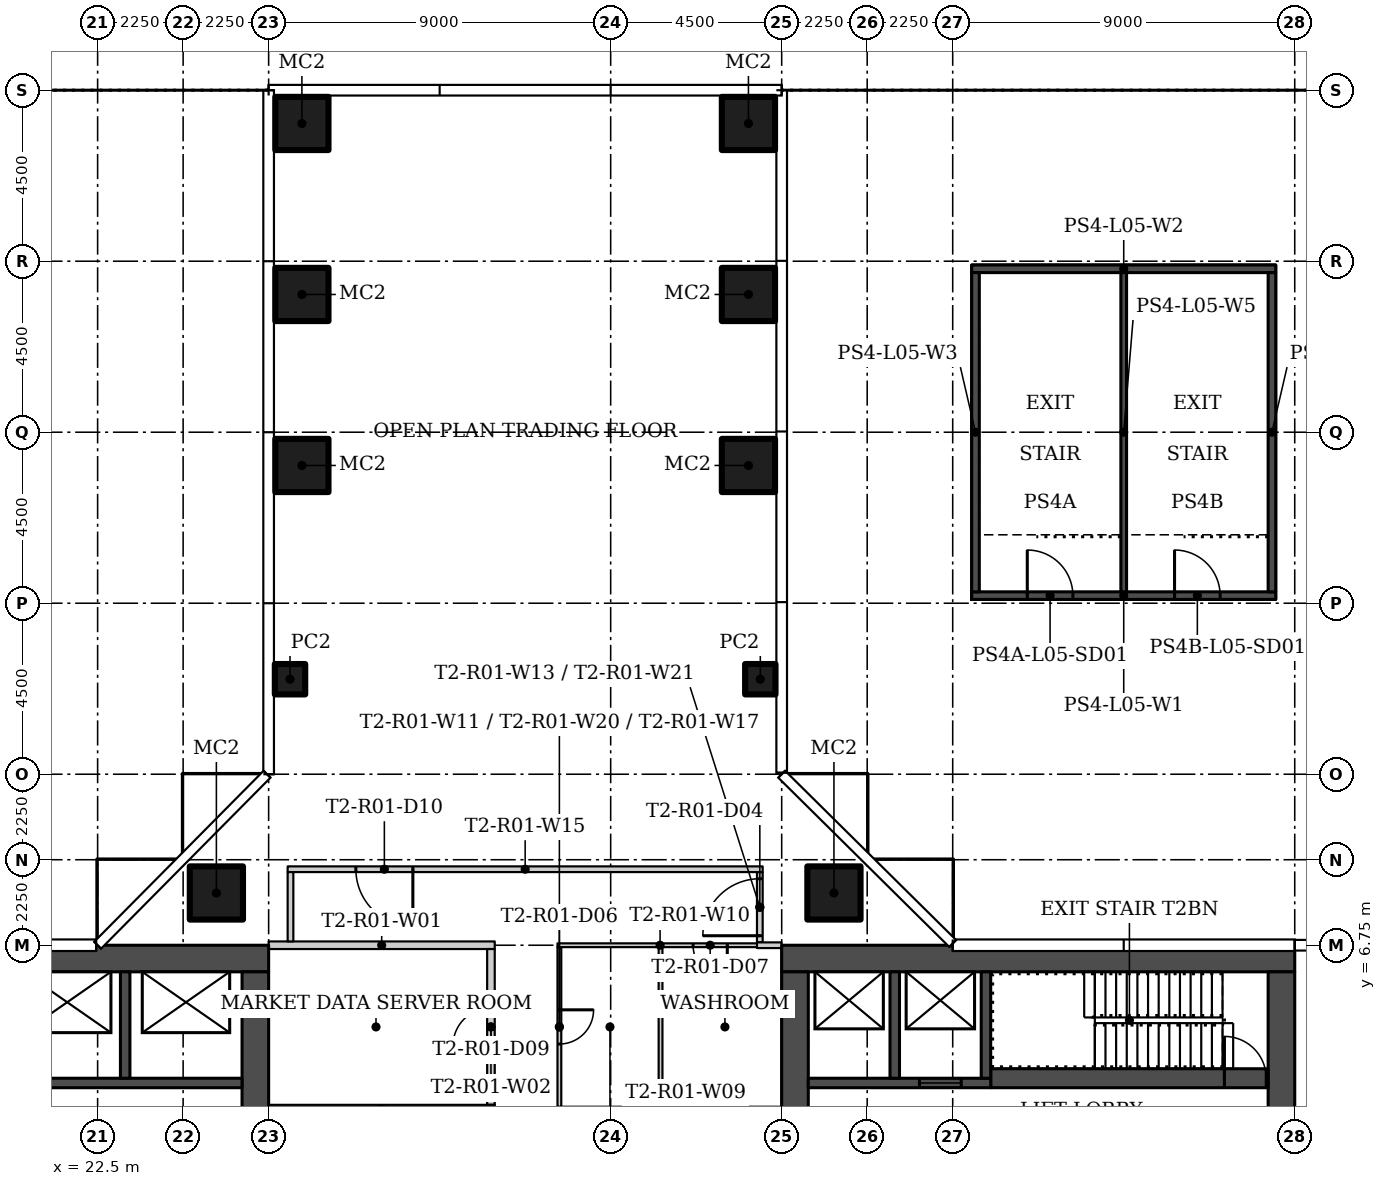
"""IFC4 building model, lengths in metres.
Left out: names, types, materials, properties, quantities, classifications, styles, units other than length and angle.
Written with IfcOpenShell. Run it as: python <this file> out.ifc"""

import sys

from ifc_helpers import new_model, si_unit, direction, frame, frame_2d, origin, origin_2d, place, context, subcontext, project, spatial, rectangle, hollow_rectangle, extrude, element, fill, save


model = new_model("IFC4")
c1 = context("Model", 3, precision=1e-05, world=origin(), true_north=direction((0.0, 1.0)))
c2 = subcontext(c1, "Body", "Model", "MODEL_VIEW")
j1 = project(units=[si_unit("LENGTHUNIT", "METRE"), si_unit("PLANEANGLEUNIT", "RADIAN")], contexts=[c1])
p1 = place(None, origin())
s1 = spatial("IfcSite", under=j1, at=p1, CompositionType="ELEMENT")
p2 = place(p1, origin())
s2 = spatial("IfcBuilding", under=s1, at=p2, CompositionType="ELEMENT")
p3 = place(p2, frame((0.0, 0.0, 28.5)))
s3 = spatial("IfcBuildingStorey", under=s2, at=p3, CompositionType="ELEMENT", Elevation=28.5)
for number, where in (
    (1, (25.625, 8.125, 0.0)),
    (2, (41.875, 8.125, 0.0)),
):
    element("IfcColumn", number, at=place(p3, frame(where)), inside=s3, PredefinedType="COLUMN", context=c2, shape_type="SweptSolid", body=[
        extrude(hollow_rectangle(XDim=1.4, YDim=1.4, WallThickness=0.05, at=origin_2d()), origin(), (0.0, 0.0, 1.0), 4.15),
    ])
p4 = place(p3, frame((39.938, 13.75, 0.0)))
e3 = element("IfcColumn", 3, at=p4, inside=s3, PredefinedType="COLUMN", context=c2, shape_type="SweptSolid", body=[
    extrude(hollow_rectangle(XDim=0.8, YDim=0.8, WallThickness=0.025, at=origin_2d()), origin(), (0.0, 0.0, 1.0), 4.15),
])
for number, where in (
    (4, (39.625, 19.375, 0.0)),
    (5, (39.625, 23.875, 0.0)),
    (6, (39.625, 28.375, 0.0)),
):
    element("IfcColumn", number, at=place(p3, frame(where)), inside=s3, PredefinedType="COLUMN", context=c2, shape_type="SweptSolid", body=[
        extrude(hollow_rectangle(XDim=1.4, YDim=1.4, WallThickness=0.05, at=origin_2d()), origin(), (0.0, 0.0, 1.0), 4.15),
    ])
p5 = place(p3, frame((27.562, 13.75, 0.0)))
e7 = element("IfcColumn", 7, at=p5, inside=s3, PredefinedType="COLUMN", context=c2, shape_type="SweptSolid", body=[
    extrude(hollow_rectangle(XDim=0.8, YDim=0.8, WallThickness=0.025, at=origin_2d()), origin(), (0.0, 0.0, 1.0), 4.15),
])
for number, where in (
    (8, (27.875, 19.375, 0.0)),
    (9, (27.875, 23.875, 0.0)),
    (10, (27.875, 28.375, 0.0)),
):
    element("IfcColumn", number, at=place(p3, frame(where)), inside=s3, PredefinedType="COLUMN", context=c2, shape_type="SweptSolid", body=[
        extrude(hollow_rectangle(XDim=1.4, YDim=1.4, WallThickness=0.05, at=origin_2d()), origin(), (0.0, 0.0, 1.0), 4.15),
    ])
p6 = place(p3, frame((32.95, 6.75, 0.0), z_axis=(0.0, 0.0, 1.0), x_axis=(-1.0, 0.0, 0.0)))
e11 = element("IfcWall", 11, at=p6, inside=s3, PredefinedType="PARTITIONING", context=c2, shape_type="SweptSolid", body=[
    extrude(rectangle(XDim=5.95, YDim=0.2, at=frame_2d((2.975, 0.0))), origin(), (0.0, 0.0, 1.0), 4.15),
])
p7 = place(p3, frame((32.85, 2.55, 0.0), z_axis=(0.0, 0.0, 1.0), x_axis=(0.0, 1.0, 0.0)))
e12 = element("IfcWall", 12, at=p7, inside=s3, PredefinedType="PARTITIONING", context=c2, shape_type="SweptSolid", body=[
    extrude(rectangle(XDim=4.1, YDim=0.2, at=frame_2d((2.05, 0.0))), origin(), (0.0, 0.0, 1.0), 4.15),
])
p8 = place(p7, frame((1.55, 0.0, 0.0)))
e13 = element("IfcOpeningElement", 13, at=p8, cuts=e12, PredefinedType="OPENING", context=c2, shape_type="SweptSolid", body=[
    extrude(rectangle(XDim=1.0, YDim=2.1, at=frame_2d((0.5, 1.05))), frame((0.0, 0.11, 0.0), z_axis=(0.0, -1.0, 0.0), x_axis=(1.0, 0.0, 0.0)), (0.0, 0.0, 1.0), 0.22),
])
p9 = place(p3, frame((27.0, 2.45, 0.0)))
e14 = element("IfcWall", 14, at=p9, inside=s3, PredefinedType="PARTITIONING", context=c2, shape_type="SweptSolid", body=[
    extrude(rectangle(XDim=5.95, YDim=0.2, at=frame_2d((2.975, 0.0))), origin(), (0.0, 0.0, 1.0), 4.15),
])
p10 = place(p3, frame((34.6, 2.45, 0.0)))
e15 = element("IfcWall", 15, at=p10, inside=s3, PredefinedType="PARTITIONING", context=c2, shape_type="SweptSolid", body=[
    extrude(rectangle(XDim=5.9, YDim=0.1, at=frame_2d((2.95, 0.0))), origin(), (0.0, 0.0, 1.0), 4.15),
])
p11 = place(p3, frame((40.0, 6.75, 0.0), z_axis=(0.0, 0.0, 1.0), x_axis=(-1.0, 0.0, 0.0)))
e16 = element("IfcWall", 16, at=p11, inside=s3, PredefinedType="PARTITIONING", context=c2, shape_type="SweptSolid", body=[
    extrude(rectangle(XDim=5.399, YDim=0.1, at=frame_2d((2.7, 0.0))), origin(), (0.0, 0.0, 1.0), 4.15),
])
p12 = place(p11, frame((0.931, 0.0, 0.0)))
e17 = element("IfcOpeningElement", 17, at=p12, cuts=e16, PredefinedType="OPENING", context=c2, shape_type="SweptSolid", body=[
    extrude(rectangle(XDim=0.9, YDim=2.1, at=frame_2d((0.45, 1.05))), frame((0.0, 0.06, 0.0), z_axis=(0.0, -1.0, 0.0), x_axis=(1.0, 0.0, 0.0)), (0.0, 0.0, 1.0), 0.12),
])
p13 = place(p3, frame((34.65, 6.7, 0.0), z_axis=(0.0, 0.0, 1.0), x_axis=(0.0, -1.0, 0.0)))
e18 = element("IfcWall", 18, at=p13, inside=s3, PredefinedType="PARTITIONING", context=c2, shape_type="SweptSolid", body=[
    extrude(rectangle(XDim=4.2, YDim=0.1, at=frame_2d((2.1, 0.0))), origin(), (0.0, 0.0, 1.0), 4.15),
])
p14 = place(p13, frame((1.65, 0.0, 0.0)))
e19 = element("IfcOpeningElement", 19, at=p14, cuts=e18, PredefinedType="OPENING", context=c2, shape_type="SweptSolid", body=[
    extrude(rectangle(XDim=0.9, YDim=2.1, at=frame_2d((0.45, 1.05))), frame((0.0, 0.06, 0.0), z_axis=(0.0, -1.0, 0.0), x_axis=(1.0, 0.0, 0.0)), (0.0, 0.0, 1.0), 0.12),
])
p15 = place(p3, frame((39.925, 6.825, 0.0), z_axis=(0.0, 0.0, 1.0), x_axis=(0.0, 1.0, 0.0)))
e20 = element("IfcWall", 20, at=p15, inside=s3, PredefinedType="PARTITIONING", context=c2, shape_type="SweptSolid", body=[
    extrude(rectangle(XDim=1.85, YDim=0.15, at=frame_2d((0.925, 0.0))), origin(), (0.0, 0.0, 1.0), 4.15),
])
p16 = place(p15, frame((0.175, 0.0, 0.0)))
e21 = element("IfcOpeningElement", 21, at=p16, cuts=e20, PredefinedType="OPENING", context=c2, shape_type="SweptSolid", body=[
    extrude(rectangle(XDim=1.5, YDim=2.4, at=frame_2d((0.75, 1.2))), frame((0.0, 0.085, 0.0), z_axis=(0.0, -1.0, 0.0), x_axis=(1.0, 0.0, 0.0)), (0.0, 0.0, 1.0), 0.17),
])
p17 = place(p3, frame((40.0, 8.75, 0.0), z_axis=(0.0, 0.0, 1.0), x_axis=(-1.0, 0.0, 0.0)))
e22 = element("IfcWall", 22, at=p17, inside=s3, PredefinedType="PARTITIONING", context=c2, shape_type="SweptSolid", body=[
    extrude(rectangle(XDim=12.5, YDim=0.15, at=frame_2d((6.25, 0.0))), origin(), (0.0, 0.0, 1.0), 4.15),
])
p18 = place(p17, frame((9.205, 0.0, 0.0)))
e23 = element("IfcOpeningElement", 23, at=p18, cuts=e22, PredefinedType="OPENING", context=c2, shape_type="SweptSolid", body=[
    extrude(rectangle(XDim=1.5, YDim=2.4, at=frame_2d((0.75, 1.2))), frame((0.0, 0.085, 0.0), z_axis=(0.0, -1.0, 0.0), x_axis=(1.0, 0.0, 0.0)), (0.0, 0.0, 1.0), 0.17),
])
p19 = place(p3, frame((27.575, 8.675, 0.0), z_axis=(0.0, 0.0, 1.0), x_axis=(0.0, -1.0, 0.0)))
e24 = element("IfcWall", 24, at=p19, inside=s3, PredefinedType="PARTITIONING", context=c2, shape_type="SweptSolid", body=[
    extrude(rectangle(XDim=1.825, YDim=0.15, at=frame_2d((0.913, 0.0))), origin(), (0.0, 0.0, 1.0), 4.15),
])
p20 = place(p3, frame((37.312, 6.7, 0.0), z_axis=(0.0, 0.0, 1.0), x_axis=(0.0, -1.0, 0.0)))
e25 = element("IfcWall", 25, at=p20, inside=s3, PredefinedType="PARTITIONING", context=c2, shape_type="SweptSolid", body=[
    extrude(rectangle(XDim=4.2, YDim=0.1, at=frame_2d((2.1, 0.0))), origin(), (0.0, 0.0, 1.0), 4.15),
])
p21 = place(p3, frame((40.5, 6.75, 0.0), z_axis=(0.0, 0.0, 1.0), x_axis=(-1.0, 0.0, 0.0)))
e26 = element("IfcWall", 26, at=p21, inside=s3, PredefinedType="PARTITIONING", context=c2, shape_type="SweptSolid", body=[
    extrude(rectangle(XDim=0.65, YDim=0.15, at=frame_2d((0.325, 0.0))), origin(), (0.0, 0.0, 1.0), 4.15),
])
p22 = place(p3, frame((13.5, 6.4, 0.0)))
e27 = element("IfcWall", 27, at=p22, inside=s3, PredefinedType="SHEAR", context=c2, shape_type="SweptSolid", body=[
    extrude(rectangle(XDim=13.5, YDim=0.7, at=frame_2d((6.75, 0.0))), origin(), (0.0, 0.0, 1.0), 4.15),
])
p23 = place(p3, frame((26.65, 6.05, 0.0), z_axis=(0.0, 0.0, 1.0), x_axis=(0.0, -1.0, 0.0)))
e28 = element("IfcWall", 28, at=p23, inside=s3, PredefinedType="SHEAR", context=c2, shape_type="SweptSolid", body=[
    extrude(rectangle(XDim=12.1, YDim=0.7, at=frame_2d((6.05, 0.0))), origin(), (0.0, 0.0, 1.0), 4.15),
])
p24 = place(p23, frame((10.1, 0.0, 0.0)))
e29 = element("IfcOpeningElement", 29, at=p24, cuts=e28, PredefinedType="OPENING", context=c2, shape_type="SweptSolid", body=[
    extrude(rectangle(XDim=1.2, YDim=2.1, at=frame_2d((0.6, 1.05))), frame((0.0, 0.36, 0.0), z_axis=(0.0, -1.0, 0.0), x_axis=(1.0, 0.0, 0.0)), (0.0, 0.0, 1.0), 0.72),
])
p25 = place(p23, frame((3.9, 0.0, 0.0)))
e30 = element("IfcOpeningElement", 30, at=p25, cuts=e28, PredefinedType="OPENING", context=c2, shape_type="SweptSolid", body=[
    extrude(rectangle(XDim=1.8, YDim=2.4, at=frame_2d((0.9, 1.2))), frame((0.0, 0.36, 0.0), z_axis=(0.0, -1.0, 0.0), x_axis=(1.0, 0.0, 0.0)), (0.0, 0.0, 1.0), 0.72),
])
p26 = place(p3, frame((14.2, 3.125, 0.0)))
e31 = element("IfcWall", 31, at=p26, inside=s3, PredefinedType="SHEAR", context=c2, shape_type="SweptSolid", body=[
    extrude(rectangle(XDim=12.1, YDim=0.25, at=frame_2d((6.05, 0.0))), origin(), (0.0, 0.0, 1.0), 4.15),
])
p27 = place(p26, frame((0.85, 0.0, 0.0)))
e32 = element("IfcOpeningElement", 32, at=p27, cuts=e31, PredefinedType="OPENING", context=c2, shape_type="SweptSolid", body=[
    extrude(rectangle(XDim=1.1, YDim=2.1, at=frame_2d((0.55, 1.05))), frame((0.0, 0.135, 0.0), z_axis=(0.0, -1.0, 0.0), x_axis=(1.0, 0.0, 0.0)), (0.0, 0.0, 1.0), 0.27),
])
p28 = place(p26, frame((3.9, 0.0, 0.0)))
e33 = element("IfcOpeningElement", 33, at=p28, cuts=e31, PredefinedType="OPENING", context=c2, shape_type="SweptSolid", body=[
    extrude(rectangle(XDim=1.1, YDim=2.1, at=frame_2d((0.55, 1.05))), frame((0.0, 0.135, 0.0), z_axis=(0.0, -1.0, 0.0), x_axis=(1.0, 0.0, 0.0)), (0.0, 0.0, 1.0), 0.27),
])
p29 = place(p3, frame((23.225, 3.25, 0.0), z_axis=(0.0, 0.0, 1.0), x_axis=(0.0, 1.0, 0.0)))
e34 = element("IfcWall", 34, at=p29, inside=s3, PredefinedType="SHEAR", context=c2, shape_type="SweptSolid", body=[
    extrude(rectangle(XDim=2.8, YDim=0.25, at=frame_2d((1.4, 0.0))), origin(), (0.0, 0.0, 1.0), 4.15),
])
p30 = place(p3, frame((54.0, 6.4, 0.0), z_axis=(0.0, 0.0, 1.0), x_axis=(-1.0, 0.0, 0.0)))
e35 = element("IfcWall", 35, at=p30, inside=s3, PredefinedType="SHEAR", context=c2, shape_type="SweptSolid", body=[
    extrude(rectangle(XDim=13.5, YDim=0.7, at=frame_2d((6.75, 0.0))), origin(), (0.0, 0.0, 1.0), 4.15),
])
p31 = place(p3, frame((53.65, -6.05, 0.0), z_axis=(0.0, 0.0, 1.0), x_axis=(0.0, 1.0, 0.0)))
e36 = element("IfcWall", 36, at=p31, inside=s3, PredefinedType="SHEAR", context=c2, shape_type="SweptSolid", body=[
    extrude(rectangle(XDim=12.1, YDim=0.7, at=frame_2d((6.05, 0.0))), origin(), (0.0, 0.0, 1.0), 4.15),
])
p32 = place(p31, frame((6.4, 0.0, 0.0)))
e37 = element("IfcOpeningElement", 37, at=p32, cuts=e36, PredefinedType="OPENING", context=c2, shape_type="SweptSolid", body=[
    extrude(rectangle(XDim=1.8, YDim=2.4, at=frame_2d((0.9, 1.2))), frame((0.0, 0.36, 0.0), z_axis=(0.0, -1.0, 0.0), x_axis=(1.0, 0.0, 0.0)), (0.0, 0.0, 1.0), 0.72),
])
p33 = place(p3, frame((40.85, -6.05, 0.0), z_axis=(0.0, 0.0, 1.0), x_axis=(0.0, 1.0, 0.0)))
e38 = element("IfcWall", 38, at=p33, inside=s3, PredefinedType="SHEAR", context=c2, shape_type="SweptSolid", body=[
    extrude(rectangle(XDim=12.1, YDim=0.7, at=frame_2d((6.05, 0.0))), origin(), (0.0, 0.0, 1.0), 4.15),
])
p34 = place(p33, frame((0.8, 0.0, 0.0)))
e39 = element("IfcOpeningElement", 39, at=p34, cuts=e38, PredefinedType="OPENING", context=c2, shape_type="SweptSolid", body=[
    extrude(rectangle(XDim=1.2, YDim=2.1, at=frame_2d((0.6, 1.05))), frame((0.0, 0.36, 0.0), z_axis=(0.0, -1.0, 0.0), x_axis=(1.0, 0.0, 0.0)), (0.0, 0.0, 1.0), 0.72),
])
p35 = place(p33, frame((6.4, 0.0, 0.0)))
e40 = element("IfcOpeningElement", 40, at=p35, cuts=e38, PredefinedType="OPENING", context=c2, shape_type="SweptSolid", body=[
    extrude(rectangle(XDim=1.8, YDim=2.4, at=frame_2d((0.9, 1.2))), frame((0.0, 0.36, 0.0), z_axis=(0.0, -1.0, 0.0), x_axis=(1.0, 0.0, 0.0)), (0.0, 0.0, 1.0), 0.72),
])
p36 = place(p3, frame((46.0, 3.25, 0.0)))
e41 = element("IfcWall", 41, at=p36, inside=s3, PredefinedType="SHEAR", context=c2, shape_type="SweptSolid", body=[
    extrude(rectangle(XDim=7.3, YDim=0.5, at=frame_2d((3.65, 0.0))), origin(), (0.0, 0.0, 1.0), 4.15),
])
p37 = place(p36, frame((6.15, 0.0, 0.0)))
e42 = element("IfcOpeningElement", 42, at=p37, cuts=e41, PredefinedType="OPENING", context=c2, shape_type="SweptSolid", body=[
    extrude(rectangle(XDim=1.1, YDim=2.1, at=frame_2d((0.55, 1.05))), frame((0.0, 0.26, 0.0), z_axis=(0.0, -1.0, 0.0), x_axis=(1.0, 0.0, 0.0)), (0.0, 0.0, 1.0), 0.52),
])
p38 = place(p3, frame((46.0, 3.125, 0.0), z_axis=(0.0, 0.0, 1.0), x_axis=(-1.0, 0.0, 0.0)))
e43 = element("IfcWall", 43, at=p38, inside=s3, PredefinedType="SHEAR", context=c2, shape_type="SweptSolid", body=[
    extrude(rectangle(XDim=4.8, YDim=0.25, at=frame_2d((2.4, 0.0))), origin(), (0.0, 0.0, 1.0), 4.15),
])
p39 = place(p38, frame((0.775, 0.0, 0.0)))
e44 = element("IfcOpeningElement", 44, at=p39, cuts=e43, PredefinedType="OPENING", context=c2, shape_type="SweptSolid", body=[
    extrude(rectangle(XDim=1.1, YDim=2.1, at=frame_2d((0.55, 1.05))), frame((0.0, 0.135, 0.0), z_axis=(0.0, -1.0, 0.0), x_axis=(1.0, 0.0, 0.0)), (0.0, 0.0, 1.0), 0.27),
])
for number, where, z_axis, x_axis in (
    (45, (45.875, 3.25, 0.0), (0.0, 0.0, 1.0), (0.0, 1.0, 0.0)),
    (46, (43.475, 3.25, 0.0), (0.0, 0.0, 1.0), (0.0, 1.0, 0.0)),
):
    element("IfcWall", number, at=place(p3, frame(where, z_axis=z_axis, x_axis=x_axis)), inside=s3, PredefinedType="SHEAR", context=c2, shape_type="SweptSolid", body=[
        extrude(rectangle(XDim=2.8, YDim=0.25, at=frame_2d((1.4, 0.0))), origin(), (0.0, 0.0, 1.0), 4.15),
    ])
p40 = place(p3, frame((45.5, 15.95, 0.0)))
e47 = element("IfcWall", 47, at=p40, inside=s3, PredefinedType="SHEAR", context=c2, shape_type="SweptSolid", body=[
    extrude(rectangle(XDim=8.0, YDim=0.2, at=frame_2d((4.0, 0.0))), origin(), (0.0, 0.0, 1.0), 2.8),
])
p41 = place(p40, frame((1.462, 0.0, 0.0)))
e48 = element("IfcOpeningElement", 48, at=p41, cuts=e47, PredefinedType="OPENING", context=c2, shape_type="SweptSolid", body=[
    extrude(rectangle(XDim=1.2, YDim=2.4, at=frame_2d((0.6, 1.2))), frame((0.0, 0.11, 0.0), z_axis=(0.0, -1.0, 0.0), x_axis=(1.0, 0.0, 0.0)), (0.0, 0.0, 1.0), 0.22),
])
p42 = place(p40, frame((5.337, 0.0, 0.0)))
e49 = element("IfcOpeningElement", 49, at=p42, cuts=e47, PredefinedType="OPENING", context=c2, shape_type="SweptSolid", body=[
    extrude(rectangle(XDim=1.2, YDim=2.4, at=frame_2d((0.6, 1.2))), frame((0.0, 0.11, 0.0), z_axis=(0.0, -1.0, 0.0), x_axis=(1.0, 0.0, 0.0)), (0.0, 0.0, 1.0), 0.22),
])
p43 = place(p3, frame((45.5, 24.55, 0.0)))
e50 = element("IfcWall", 50, at=p43, inside=s3, PredefinedType="SHEAR", context=c2, shape_type="SweptSolid", body=[
    extrude(rectangle(XDim=8.0, YDim=0.2, at=frame_2d((4.0, 0.0))), origin(), (0.0, 0.0, 1.0), 2.8),
])
for number, where, z_axis, x_axis in (
    (51, (45.6, 16.05, 0.0), (0.0, 0.0, 1.0), (0.0, 1.0, 0.0)),
    (52, (53.4, 16.05, 0.0), (0.0, 0.0, 1.0), (0.0, 1.0, 0.0)),
):
    element("IfcWall", number, at=place(p3, frame(where, z_axis=z_axis, x_axis=x_axis)), inside=s3, PredefinedType="SHEAR", context=c2, shape_type="SweptSolid", body=[
        extrude(rectangle(XDim=8.4, YDim=0.2, at=frame_2d((4.2, 0.0))), origin(), (0.0, 0.0, 1.0), 2.8),
    ])
p44 = place(p3, frame((49.5, 16.05, 0.0), z_axis=(0.0, 0.0, 1.0), x_axis=(0.0, 1.0, 0.0)))
e53 = element("IfcWall", 53, at=p44, inside=s3, PredefinedType="SHEAR", context=c2, shape_type="SweptSolid", body=[
    extrude(rectangle(XDim=8.4, YDim=0.15, at=frame_2d((4.2, 0.0))), origin(), (0.0, 0.0, 1.0), 2.8),
])
p45 = place(p16, origin())
e54 = element("IfcDoor", 54, at=p45, inside=s3, OperationType="DOUBLE_DOOR_SINGLE_SWING", PredefinedType="DOOR", context=c2, shape_type="SweptSolid", body=[
    extrude(rectangle(XDim=1.5, YDim=2.4, at=frame_2d((0.75, 1.2))), frame((0.0, 0.025, 0.0), z_axis=(0.0, -1.0, 0.0), x_axis=(1.0, 0.0, 0.0)), (0.0, 0.0, 1.0), 0.05),
])
fill(e21, e54)
p46 = place(p14, origin())
e55 = element("IfcDoor", 55, at=p46, inside=s3, OperationType="SINGLE_SWING_RIGHT", PredefinedType="DOOR", context=c2, shape_type="SweptSolid", body=[
    extrude(rectangle(XDim=0.9, YDim=2.1, at=frame_2d((0.45, 1.05))), frame((0.0, 0.025, 0.0), z_axis=(0.0, -1.0, 0.0), x_axis=(1.0, 0.0, 0.0)), (0.0, 0.0, 1.0), 0.05),
])
fill(e19, e55)
p47 = place(p12, origin())
e56 = element("IfcDoor", 56, at=p47, inside=s3, OperationType="SINGLE_SWING_RIGHT", PredefinedType="DOOR", context=c2, shape_type="SweptSolid", body=[
    extrude(rectangle(XDim=0.9, YDim=2.1, at=frame_2d((0.45, 1.05))), frame((0.0, 0.025, 0.0), z_axis=(0.0, -1.0, 0.0), x_axis=(1.0, 0.0, 0.0)), (0.0, 0.0, 1.0), 0.05),
])
fill(e17, e56)
p48 = place(p8, origin())
e57 = element("IfcDoor", 57, at=p48, inside=s3, OperationType="SINGLE_SWING_RIGHT", PredefinedType="DOOR", context=c2, shape_type="SweptSolid", body=[
    extrude(rectangle(XDim=1.0, YDim=2.1, at=frame_2d((0.5, 1.05))), frame((0.0, 0.025, 0.0), z_axis=(0.0, -1.0, 0.0), x_axis=(1.0, 0.0, 0.0)), (0.0, 0.0, 1.0), 0.05),
])
fill(e13, e57)
p49 = place(p18, origin())
e58 = element("IfcDoor", 58, at=p49, inside=s3, OperationType="DOUBLE_DOOR_SINGLE_SWING", PredefinedType="DOOR", context=c2, shape_type="SweptSolid", body=[
    extrude(rectangle(XDim=1.5, YDim=2.4, at=frame_2d((0.75, 1.2))), frame((0.0, 0.025, 0.0), z_axis=(0.0, -1.0, 0.0), x_axis=(1.0, 0.0, 0.0)), (0.0, 0.0, 1.0), 0.05),
])
fill(e23, e58)
p50 = place(p37, origin())
e59 = element("IfcDoor", 59, at=p50, inside=s3, OperationType="SINGLE_SWING_RIGHT", PredefinedType="DOOR", context=c2, shape_type="SweptSolid", body=[
    extrude(rectangle(XDim=1.1, YDim=2.1, at=frame_2d((0.55, 1.05))), frame((0.0, 0.025, 0.0), z_axis=(0.0, -1.0, 0.0), x_axis=(1.0, 0.0, 0.0)), (0.0, 0.0, 1.0), 0.05),
])
fill(e42, e59)
p51 = place(p39, origin())
e60 = element("IfcDoor", 60, at=p51, inside=s3, OperationType="SLIDING_TO_LEFT", PredefinedType="DOOR", context=c2, shape_type="SweptSolid", body=[
    extrude(rectangle(XDim=1.1, YDim=2.1, at=frame_2d((0.55, 1.05))), frame((0.0, 0.025, 0.0), z_axis=(0.0, -1.0, 0.0), x_axis=(1.0, 0.0, 0.0)), (0.0, 0.0, 1.0), 0.05),
])
fill(e44, e60)
p52 = place(p41, origin())
e61 = element("IfcDoor", 61, at=p52, inside=s3, OperationType="SINGLE_SWING_LEFT", PredefinedType="DOOR", context=c2, shape_type="SweptSolid", body=[
    extrude(rectangle(XDim=1.2, YDim=2.4, at=frame_2d((0.6, 1.2))), frame((0.0, 0.025, 0.0), z_axis=(0.0, -1.0, 0.0), x_axis=(1.0, 0.0, 0.0)), (0.0, 0.0, 1.0), 0.05),
])
fill(e48, e61)
p53 = place(p42, origin())
e62 = element("IfcDoor", 62, at=p53, inside=s3, OperationType="SINGLE_SWING_RIGHT", PredefinedType="DOOR", context=c2, shape_type="SweptSolid", body=[
    extrude(rectangle(XDim=1.2, YDim=2.4, at=frame_2d((0.6, 1.2))), frame((0.0, 0.025, 0.0), z_axis=(0.0, -1.0, 0.0), x_axis=(1.0, 0.0, 0.0)), (0.0, 0.0, 1.0), 0.05),
])
fill(e49, e62)
save(model, sys.argv[1])
